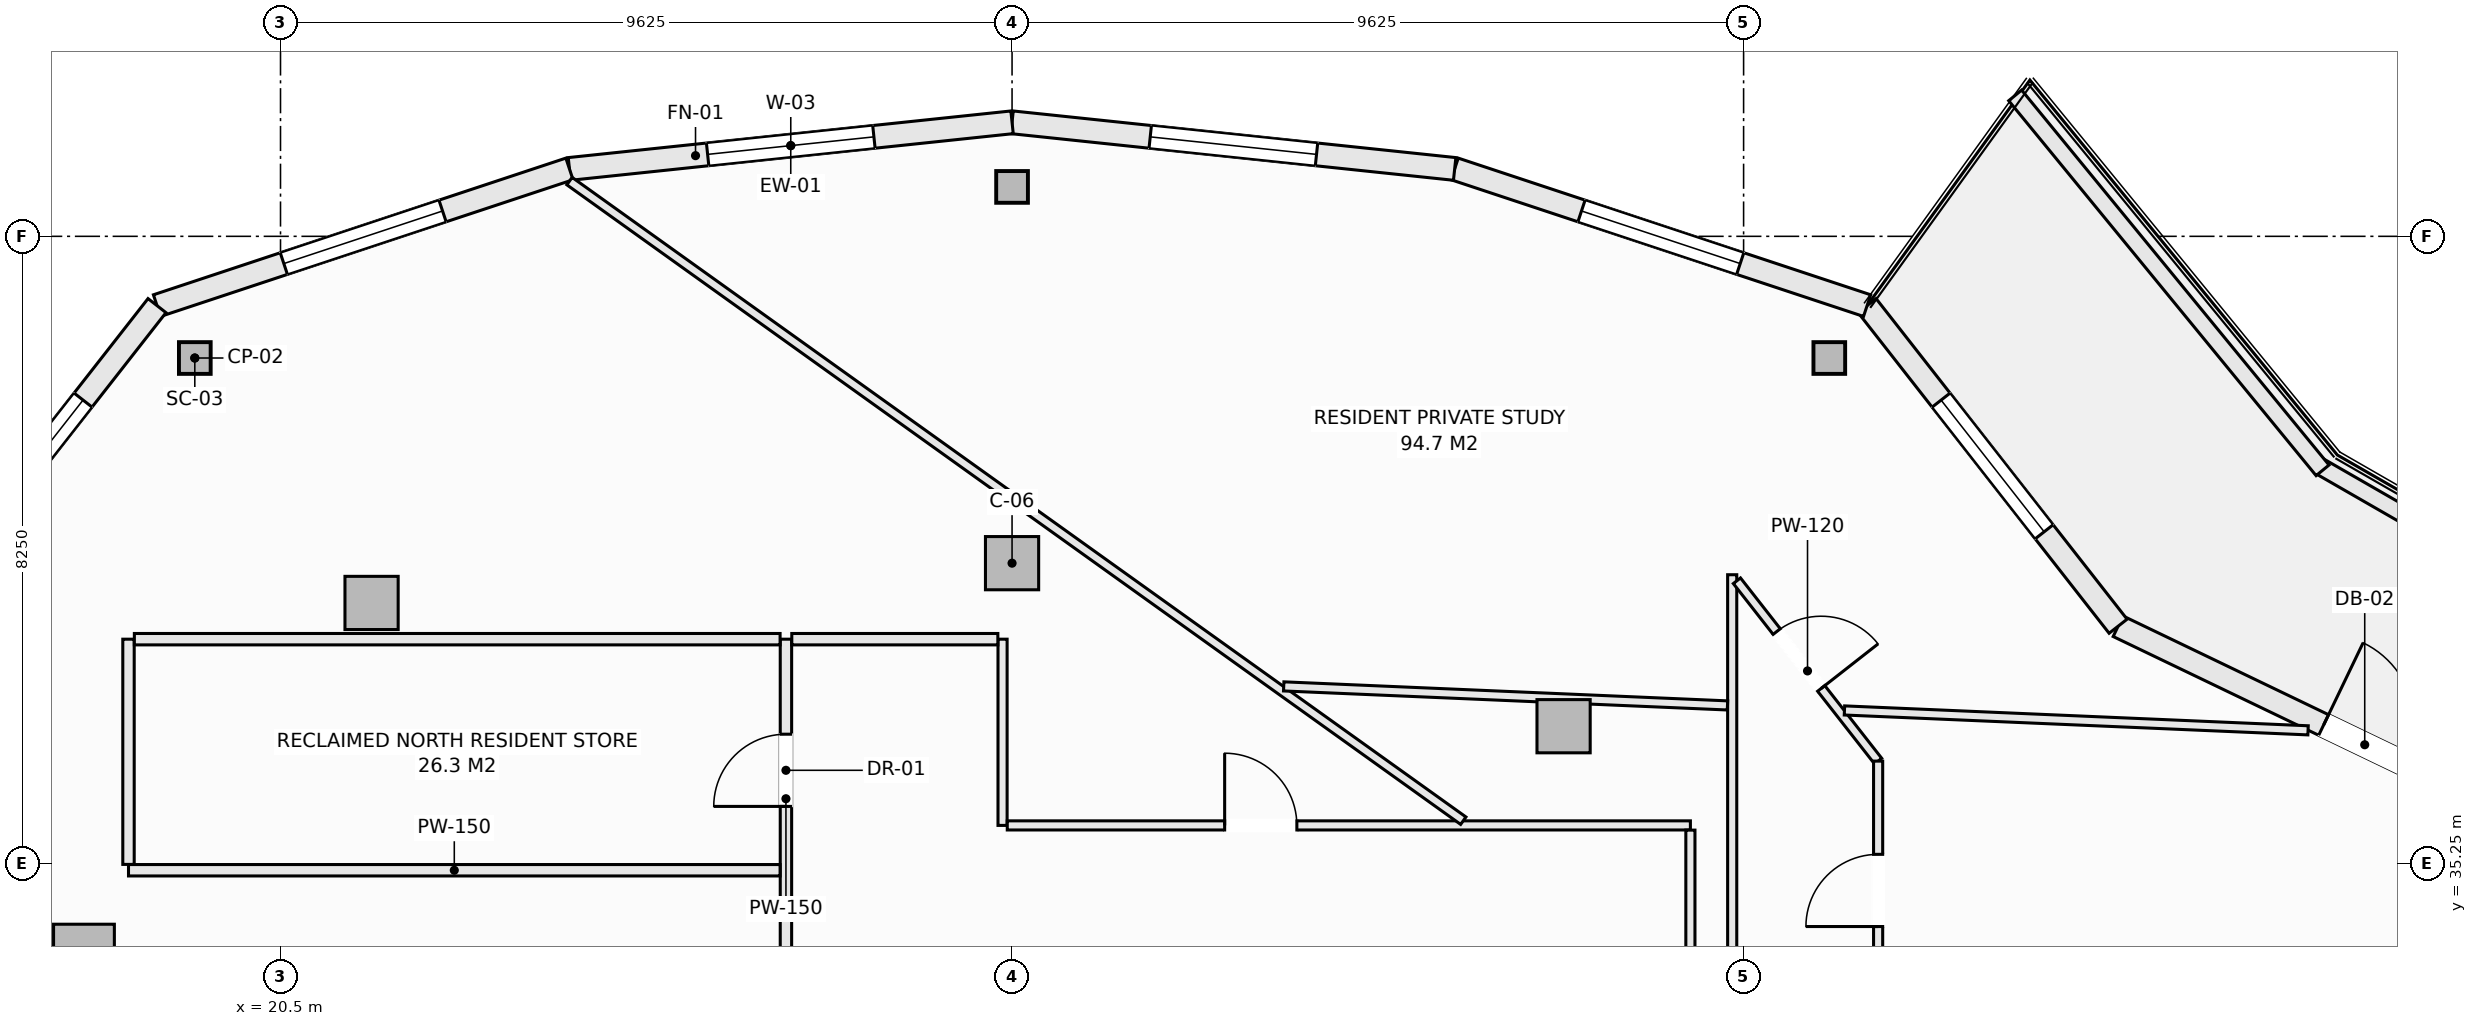
"""IFC4 building model, lengths in metres.
Left out: names, types, materials, properties, quantities, classifications, styles, units other than length and angle.
Written with IfcOpenShell. Run it as: python <this file> out.ifc"""

import sys

from ifc_helpers import new_model, si_unit, direction, frame, frame_2d, origin, origin_2d, place, context, subcontext, project, spatial, rectangle, hollow_rectangle, extrude, element, fill, save


model = new_model("IFC4")
c1 = context("Model", 3, precision=1e-05, world=origin(), true_north=direction((0.0, 1.0)))
c2 = subcontext(c1, "Body", "Model", "MODEL_VIEW")
j1 = project(units=[si_unit("LENGTHUNIT", "METRE"), si_unit("PLANEANGLEUNIT", "RADIAN")], contexts=[c1])
p1 = place(None, origin())
s1 = spatial("IfcSite", under=j1, at=p1, CompositionType="ELEMENT")
p2 = place(p1, origin())
s2 = spatial("IfcBuilding", under=s1, at=p2, CompositionType="ELEMENT")
p3 = place(p2, frame((0.0, 0.0, 255.8)))
s3 = spatial("IfcBuildingStorey", under=s2, at=p3, CompositionType="ELEMENT", Elevation=255.8)
for number, where, z_axis, x_axis in (
    (1, (40.878, 41.899, -0.27), (0.0, 0.0, 1.0), (1.0, 0.0, 0.0)),
    (2, (30.125, 44.15, -0.27), (0.0, 0.0, 1.0), (1.0, 0.0, 0.0)),
    (3, (19.372, 41.899, -0.27), (0.0, 0.0, 1.0), (1.0, 0.0, 0.0)),
):
    element("IfcColumn", number, at=place(p3, frame(where, z_axis=z_axis, x_axis=x_axis)), inside=s3, PredefinedType="COLUMN", context=c2, shape_type="SweptSolid", body=[
        extrude(hollow_rectangle(XDim=0.406, YDim=0.406, WallThickness=0.016, at=origin_2d()), origin(), (0.0, 0.0, 1.0), 3.3),
    ])
for number, where, z_axis, x_axis in (
    (4, (37.382, 37.055, -0.27), (0.0, 0.0, 1.0), (1.0, 0.0, 0.0)),
    (5, (30.125, 39.2, -0.27), (0.0, 0.0, 1.0), (1.0, 0.0, 0.0)),
    (6, (21.698, 38.677, -0.27), (0.0, 0.0, 1.0), (1.0, 0.0, 0.0)),
):
    element("IfcColumn", number, at=place(p3, frame(where, z_axis=z_axis, x_axis=x_axis)), inside=s3, PredefinedType="COLUMN", context=c2, shape_type="SweptSolid", body=[
        extrude(rectangle(XDim=0.7, YDim=0.7, at=origin_2d()), origin(), (0.0, 0.0, 1.0), 3.3),
    ])
p4 = place(p3, frame((17.914, 34.05, -0.27), z_axis=(0.0, 0.0, 1.0), x_axis=(1.0, 0.0, 0.0)))
e7 = element("IfcColumn", 7, at=p4, inside=s3, PredefinedType="PILASTER", context=c2, shape_type="SweptSolid", body=[
    extrude(rectangle(XDim=0.8, YDim=0.8, at=origin_2d()), origin(), (0.0, 0.0, 1.0), 3.3),
])
p5 = place(p3, frame((44.677, 38.37, 0.0), z_axis=(0.0, 0.0, 1.0), x_axis=(0.901355238351, -0.433080517106, 0.0)))
e8 = element("IfcWall", 8, at=p5, inside=s3, PredefinedType="SOLIDWALL", context=c2, shape_type="SweptSolid", body=[
    extrude(rectangle(XDim=5.473, YDim=0.3, at=frame_2d((2.737, 0.0))), origin(), (0.0, 0.0, 1.0), 2.605),
])
p6 = place(p5, frame((3.0, 0.0, 0.0)))
e9 = element("IfcOpeningElement", 9, at=p6, cuts=e8, PredefinedType="OPENING", context=c2, shape_type="SweptSolid", body=[
    extrude(rectangle(XDim=1.2, YDim=2.2, at=frame_2d((0.6, 1.1))), frame((0.0, 0.16, 0.0), z_axis=(0.0, -1.0, 0.0), x_axis=(1.0, 0.0, 0.0)), (0.0, 0.0, 1.0), 0.32),
])
p7 = place(p3, frame((41.375, 42.588, 0.0), z_axis=(0.0, 0.0, 1.0), x_axis=(0.61644588519, -0.787397276241, 0.0)))
e10 = element("IfcWall", 10, at=p7, inside=s3, PredefinedType="SOLIDWALL", context=c2, shape_type="SweptSolid", body=[
    extrude(rectangle(XDim=5.357, YDim=0.3, at=frame_2d((2.678, 0.0))), origin(), (0.0, 0.0, 1.0), 2.605),
])
p8 = place(p7, frame((1.579, 0.0, 0.72)))
e11 = element("IfcOpeningElement", 11, at=p8, cuts=e10, PredefinedType="OPENING", context=c2, shape_type="SweptSolid", body=[
    extrude(rectangle(XDim=2.2, YDim=1.65, at=frame_2d((1.1, 0.825))), frame((0.0, 0.16, 0.0), z_axis=(0.0, -1.0, 0.0), x_axis=(1.0, 0.0, 0.0)), (0.0, 0.0, 1.0), 0.32),
])
p9 = place(p3, frame((35.948, 44.387, 0.0), z_axis=(0.0, 0.0, 1.0), x_axis=(0.949232769585, -0.314574552605, 0.0)))
e12 = element("IfcWall", 12, at=p9, inside=s3, PredefinedType="SOLIDWALL", context=c2, shape_type="SweptSolid", body=[
    extrude(rectangle(XDim=5.717, YDim=0.3, at=frame_2d((2.858, 0.0))), origin(), (0.0, 0.0, 1.0), 2.605),
])
p10 = place(p9, frame((1.758, 0.0, 0.72)))
e13 = element("IfcOpeningElement", 13, at=p10, cuts=e12, PredefinedType="OPENING", context=c2, shape_type="SweptSolid", body=[
    extrude(rectangle(XDim=2.2, YDim=1.65, at=frame_2d((1.1, 0.825))), frame((0.0, 0.16, 0.0), z_axis=(0.0, -1.0, 0.0), x_axis=(1.0, 0.0, 0.0)), (0.0, 0.0, 1.0), 0.32),
])
p11 = place(p3, frame((30.125, 45.0, 0.0), z_axis=(0.0, 0.0, 1.0), x_axis=(0.994500425783, -0.10473253132, 0.0)))
e14 = element("IfcWall", 14, at=p11, inside=s3, PredefinedType="SOLIDWALL", context=c2, shape_type="SweptSolid", body=[
    extrude(rectangle(XDim=5.856, YDim=0.3, at=frame_2d((2.928, 0.0))), origin(), (0.0, 0.0, 1.0), 2.605),
])
p12 = place(p11, frame((1.828, 0.0, 0.72)))
e15 = element("IfcOpeningElement", 15, at=p12, cuts=e14, PredefinedType="OPENING", context=c2, shape_type="SweptSolid", body=[
    extrude(rectangle(XDim=2.2, YDim=1.65, at=frame_2d((1.1, 0.825))), frame((0.0, 0.16, 0.0), z_axis=(0.0, -1.0, 0.0), x_axis=(1.0, 0.0, 0.0)), (0.0, 0.0, 1.0), 0.32),
])
p13 = place(p3, frame((24.302, 44.387, 0.0), z_axis=(0.0, 0.0, 1.0), x_axis=(0.994500425783, 0.10473253132, 0.0)))
e16 = element("IfcWall", 16, at=p13, inside=s3, PredefinedType="SOLIDWALL", context=c2, shape_type="SweptSolid", body=[
    extrude(rectangle(XDim=5.856, YDim=0.3, at=frame_2d((2.928, 0.0))), origin(), (0.0, 0.0, 1.0), 2.605),
])
p14 = place(p13, frame((1.828, 0.0, 0.72)))
e17 = element("IfcOpeningElement", 17, at=p14, cuts=e16, PredefinedType="OPENING", context=c2, shape_type="SweptSolid", body=[
    extrude(rectangle(XDim=2.2, YDim=1.65, at=frame_2d((1.1, 0.825))), frame((0.0, 0.16, 0.0), z_axis=(0.0, -1.0, 0.0), x_axis=(1.0, 0.0, 0.0)), (0.0, 0.0, 1.0), 0.32),
])
p15 = place(p3, frame((18.875, 42.588, 0.0), z_axis=(0.0, 0.0, 1.0), x_axis=(0.949232769585, 0.314574552605, 0.0)))
e18 = element("IfcWall", 18, at=p15, inside=s3, PredefinedType="SOLIDWALL", context=c2, shape_type="SweptSolid", body=[
    extrude(rectangle(XDim=5.717, YDim=0.3, at=frame_2d((2.858, 0.0))), origin(), (0.0, 0.0, 1.0), 2.605),
])
p16 = place(p15, frame((1.758, 0.0, 0.72)))
e19 = element("IfcOpeningElement", 19, at=p16, cuts=e18, PredefinedType="OPENING", context=c2, shape_type="SweptSolid", body=[
    extrude(rectangle(XDim=2.2, YDim=1.65, at=frame_2d((1.1, 0.825))), frame((0.0, 0.16, 0.0), z_axis=(0.0, -1.0, 0.0), x_axis=(1.0, 0.0, 0.0)), (0.0, 0.0, 1.0), 0.32),
])
p17 = place(p3, frame((15.573, 38.37, 0.0), z_axis=(0.0, 0.0, 1.0), x_axis=(0.61644588519, 0.787397276241, 0.0)))
e20 = element("IfcWall", 20, at=p17, inside=s3, PredefinedType="SOLIDWALL", context=c2, shape_type="SweptSolid", body=[
    extrude(rectangle(XDim=5.357, YDim=0.3, at=frame_2d((2.678, 0.0))), origin(), (0.0, 0.0, 1.0), 2.605),
])
p18 = place(p17, frame((1.579, 0.0, 0.72)))
e21 = element("IfcOpeningElement", 21, at=p18, cuts=e20, PredefinedType="OPENING", context=c2, shape_type="SweptSolid", body=[
    extrude(rectangle(XDim=2.2, YDim=1.65, at=frame_2d((1.1, 0.825))), frame((0.0, 0.16, 0.0), z_axis=(0.0, -1.0, 0.0), x_axis=(1.0, 0.0, 0.0)), (0.0, 0.0, 1.0), 0.32),
])
p19 = place(p3, frame((47.321, 40.479, 0.0), z_axis=(0.0, 0.0, 1.0), x_axis=(0.866901621005, -0.49847926687, 0.0)))
e22 = element("IfcWall", 22, at=p19, inside=s3, PredefinedType="PARAPET", context=c2, shape_type="SweptSolid", body=[
    extrude(rectangle(XDim=6.197, YDim=0.22, at=frame_2d((3.098, 0.0))), origin(), (0.0, 0.0, 1.0), 0.52),
])
p20 = place(p3, frame((43.323, 45.354, 0.0), z_axis=(0.0, 0.0, 1.0), x_axis=(0.63407318032, -0.77327304492, 0.0)))
e23 = element("IfcWall", 23, at=p20, inside=s3, PredefinedType="PARAPET", context=c2, shape_type="SweptSolid", body=[
    extrude(rectangle(XDim=6.379, YDim=0.22, at=frame_2d((3.189, 0.0))), origin(), (0.0, 0.0, 1.0), 0.52),
])
p21 = place(p3, frame((27.15, 34.002, 0.0), z_axis=(0.0, 0.0, 1.0), x_axis=(0.0, 1.0, 0.0)))
e24 = element("IfcWall", 24, at=p21, inside=s3, PredefinedType="PARTITIONING", context=c2, shape_type="SweptSolid", body=[
    extrude(rectangle(XDim=4.198, YDim=0.15, at=frame_2d((2.099, 0.0))), origin(), (0.0, 0.0, 1.0), 3.03),
])
p22 = place(p21, frame((1.998, 0.0, 0.0)))
e25 = element("IfcOpeningElement", 25, at=p22, cuts=e24, PredefinedType="OPENING", context=c2, shape_type="SweptSolid", body=[
    extrude(rectangle(XDim=0.95, YDim=2.1, at=frame_2d((0.475, 1.05))), frame((0.0, 0.085, 0.0), z_axis=(0.0, -1.0, 0.0), x_axis=(1.0, 0.0, 0.0)), (0.0, 0.0, 1.0), 0.17),
])
p23 = place(p3, frame((30.0, 35.75, 0.0), z_axis=(0.0, 0.0, 1.0), x_axis=(0.0, 1.0, 0.0)))
e26 = element("IfcWall", 26, at=p23, inside=s3, PredefinedType="PARTITIONING", context=c2, shape_type="SweptSolid", body=[
    extrude(rectangle(XDim=2.45, YDim=0.12, at=frame_2d((1.225, 0.0))), origin(), (0.0, 0.0, 1.0), 3.03),
])
p24 = place(p3, frame((18.5, 35.16, 0.0), z_axis=(0.0, 0.0, 1.0), x_axis=(1.0, 0.0, 0.0)))
e27 = element("IfcWall", 27, at=p24, inside=s3, PredefinedType="PARTITIONING", context=c2, shape_type="SweptSolid", body=[
    extrude(rectangle(XDim=8.573, YDim=0.15, at=frame_2d((4.287, 0.0))), origin(), (0.0, 0.0, 1.0), 3.03),
])
p25 = place(p3, frame((18.5, 35.237, 0.0), z_axis=(0.0, 0.0, 1.0), x_axis=(0.0, 1.0, 0.0)))
e28 = element("IfcWall", 28, at=p25, inside=s3, PredefinedType="PARTITIONING", context=c2, shape_type="SweptSolid", body=[
    extrude(rectangle(XDim=2.963, YDim=0.15, at=frame_2d((1.481, 0.0))), origin(), (0.0, 0.0, 1.0), 3.03),
])
p26 = place(p3, frame((18.577, 38.2, 0.0), z_axis=(0.0, 0.0, 1.0), x_axis=(1.0, 0.0, 0.0)))
e29 = element("IfcWall", 29, at=p26, inside=s3, PredefinedType="PARTITIONING", context=c2, shape_type="SweptSolid", body=[
    extrude(rectangle(XDim=8.496, YDim=0.15, at=frame_2d((4.248, 0.0))), origin(), (0.0, 0.0, 1.0), 3.03),
])
p27 = place(p3, frame((27.227, 38.2, 0.0), z_axis=(0.0, 0.0, 1.0), x_axis=(1.0, 0.0, 0.0)))
e30 = element("IfcWall", 30, at=p27, inside=s3, PredefinedType="PARTITIONING", context=c2, shape_type="SweptSolid", body=[
    extrude(rectangle(XDim=2.711, YDim=0.15, at=frame_2d((1.355, 0.0))), origin(), (0.0, 0.0, 1.0), 3.03),
])
p28 = place(p3, frame((30.062, 35.75, 0.0), z_axis=(0.0, 0.0, 1.0), x_axis=(1.0, 0.0, 0.0)))
e31 = element("IfcWall", 31, at=p28, inside=s3, PredefinedType="PARTITIONING", context=c2, shape_type="SweptSolid", body=[
    extrude(rectangle(XDim=8.988, YDim=0.12, at=frame_2d((4.494, 0.0))), origin(), (0.0, 0.0, 1.0), 2.478),
])
p29 = place(p28, frame((2.86, 0.0, 0.0)))
e32 = element("IfcOpeningElement", 32, at=p29, cuts=e31, PredefinedType="OPENING", context=c2, shape_type="SweptSolid", body=[
    extrude(rectangle(XDim=0.95, YDim=2.1, at=frame_2d((0.475, 1.05))), frame((0.0, 0.07, 0.0), z_axis=(0.0, -1.0, 0.0), x_axis=(1.0, 0.0, 0.0)), (0.0, 0.0, 1.0), 0.14),
])
p30 = place(p3, frame((39.05, 33.75, 0.0), z_axis=(0.0, 0.0, 1.0), x_axis=(0.0, 1.0, 0.0)))
e33 = element("IfcWall", 33, at=p30, inside=s3, PredefinedType="PARTITIONING", context=c2, shape_type="SweptSolid", body=[
    extrude(rectangle(XDim=1.938, YDim=0.12, at=frame_2d((0.969, 0.0))), origin(), (0.0, 0.0, 1.0), 3.03),
])
p31 = place(p3, frame((39.6, 31.182, 0.0), z_axis=(0.0, 0.0, 1.0), x_axis=(0.0, 1.0, 0.0)))
e34 = element("IfcWall", 34, at=p31, inside=s3, PredefinedType="PARTITIONING", context=c2, shape_type="SweptSolid", body=[
    extrude(rectangle(XDim=7.866, YDim=0.12, at=frame_2d((3.933, 0.0))), origin(), (0.0, 0.0, 1.0), 3.03),
])
p32 = place(p3, frame((39.662, 38.969, 0.0), z_axis=(0.0, 0.0, 1.0), x_axis=(0.616500468458, -0.787354540465, 0.0)))
e35 = element("IfcWall", 35, at=p32, inside=s3, PredefinedType="PARTITIONING", context=c2, shape_type="SweptSolid", body=[
    extrude(rectangle(XDim=3.014, YDim=0.12, at=frame_2d((1.507, 0.0))), origin(), (0.0, 0.0, 1.0), 3.03),
])
p33 = place(p32, frame((0.849, 0.0, 0.0)))
e36 = element("IfcOpeningElement", 36, at=p33, cuts=e35, PredefinedType="OPENING", context=c2, shape_type="SweptSolid", body=[
    extrude(rectangle(XDim=0.95, YDim=2.1, at=frame_2d((0.475, 1.05))), frame((0.0, 0.07, 0.0), z_axis=(0.0, -1.0, 0.0), x_axis=(1.0, 0.0, 0.0)), (0.0, 0.0, 1.0), 0.14),
])
p34 = place(p3, frame((41.52, 33.193, 0.0), z_axis=(0.0, 0.0, 1.0), x_axis=(0.0, 1.0, 0.0)))
e37 = element("IfcWall", 37, at=p34, inside=s3, PredefinedType="PARTITIONING", context=c2, shape_type="SweptSolid", body=[
    extrude(rectangle(XDim=3.403, YDim=0.12, at=frame_2d((1.701, 0.0))), origin(), (0.0, 0.0, 1.0), 3.03),
])
p35 = place(p34, frame((1.227, 0.0, 0.0)))
e38 = element("IfcOpeningElement", 38, at=p35, cuts=e37, PredefinedType="OPENING", context=c2, shape_type="SweptSolid", body=[
    extrude(rectangle(XDim=0.95, YDim=2.1, at=frame_2d((0.475, 1.05))), frame((0.0, 0.07, 0.0), z_axis=(0.0, -1.0, 0.0), x_axis=(1.0, 0.0, 0.0)), (0.0, 0.0, 1.0), 0.14),
])
p36 = place(p3, frame((24.302, 44.227, 0.0), z_axis=(0.0, 0.0, 1.0), x_axis=(0.813249507018, -0.581915147883, 0.0)))
e39 = element("IfcWall", 39, at=p36, inside=s3, PredefinedType="PARTITIONING", context=c2, shape_type="SweptSolid", body=[
    extrude(rectangle(XDim=14.46, YDim=0.12, at=frame_2d((7.23, 0.0))), origin(), (0.0, 0.0, 1.0), 2.478),
])
p37 = place(p3, frame((33.699, 37.579, 0.0), z_axis=(0.0, 0.0, 1.0), x_axis=(0.999081056781, -0.042860727724, 0.0)))
e40 = element("IfcWall", 40, at=p37, inside=s3, PredefinedType="PARTITIONING", context=c2, shape_type="SweptSolid", body=[
    extrude(rectangle(XDim=5.844, YDim=0.12, at=frame_2d((2.922, 0.0))), origin(), (0.0, 0.0, 1.0), 2.478),
])
p38 = place(p3, frame((41.077, 37.262, 0.0), z_axis=(0.0, 0.0, 1.0), x_axis=(0.999080744008, -0.042868017834, 0.0)))
e41 = element("IfcWall", 41, at=p38, inside=s3, PredefinedType="PARTITIONING", context=c2, shape_type="SweptSolid", body=[
    extrude(rectangle(XDim=6.105, YDim=0.12, at=frame_2d((3.053, 0.0))), origin(), (0.0, 0.0, 1.0), 2.605),
])
p39 = place(p6, origin())
e42 = element("IfcDoor", 42, at=p39, inside=s3, OperationType="SINGLE_SWING_LEFT", PredefinedType="DOOR", context=c2, shape_type="SweptSolid", body=[
    extrude(rectangle(XDim=1.2, YDim=2.2, at=frame_2d((0.6, 1.1))), frame((0.0, 0.025, 0.0), z_axis=(0.0, -1.0, 0.0), x_axis=(1.0, 0.0, 0.0)), (0.0, 0.0, 1.0), 0.05),
])
fill(e9, e42)
p40 = place(p8, origin())
e43 = element("IfcWindow", 43, at=p40, inside=s3, PartitioningType="SINGLE_PANEL", PredefinedType="WINDOW", context=c2, shape_type="SweptSolid", body=[
    extrude(rectangle(XDim=2.2, YDim=1.65, at=frame_2d((1.1, 0.825))), frame((0.0, 0.03, 0.0), z_axis=(0.0, -1.0, 0.0), x_axis=(1.0, 0.0, 0.0)), (0.0, 0.0, 1.0), 0.06),
])
fill(e11, e43)
p41 = place(p10, origin())
e44 = element("IfcWindow", 44, at=p41, inside=s3, PartitioningType="SINGLE_PANEL", PredefinedType="WINDOW", context=c2, shape_type="SweptSolid", body=[
    extrude(rectangle(XDim=2.2, YDim=1.65, at=frame_2d((1.1, 0.825))), frame((0.0, 0.03, 0.0), z_axis=(0.0, -1.0, 0.0), x_axis=(1.0, 0.0, 0.0)), (0.0, 0.0, 1.0), 0.06),
])
fill(e13, e44)
p42 = place(p12, origin())
e45 = element("IfcWindow", 45, at=p42, inside=s3, PartitioningType="SINGLE_PANEL", PredefinedType="WINDOW", context=c2, shape_type="SweptSolid", body=[
    extrude(rectangle(XDim=2.2, YDim=1.65, at=frame_2d((1.1, 0.825))), frame((0.0, 0.03, 0.0), z_axis=(0.0, -1.0, 0.0), x_axis=(1.0, 0.0, 0.0)), (0.0, 0.0, 1.0), 0.06),
])
fill(e15, e45)
p43 = place(p14, origin())
e46 = element("IfcWindow", 46, at=p43, inside=s3, PartitioningType="SINGLE_PANEL", PredefinedType="WINDOW", context=c2, shape_type="SweptSolid", body=[
    extrude(rectangle(XDim=2.2, YDim=1.65, at=frame_2d((1.1, 0.825))), frame((0.0, 0.03, 0.0), z_axis=(0.0, -1.0, 0.0), x_axis=(1.0, 0.0, 0.0)), (0.0, 0.0, 1.0), 0.06),
])
fill(e17, e46)
p44 = place(p16, origin())
e47 = element("IfcWindow", 47, at=p44, inside=s3, PartitioningType="SINGLE_PANEL", PredefinedType="WINDOW", context=c2, shape_type="SweptSolid", body=[
    extrude(rectangle(XDim=2.2, YDim=1.65, at=frame_2d((1.1, 0.825))), frame((0.0, 0.03, 0.0), z_axis=(0.0, -1.0, 0.0), x_axis=(1.0, 0.0, 0.0)), (0.0, 0.0, 1.0), 0.06),
])
fill(e19, e47)
p45 = place(p18, origin())
e48 = element("IfcWindow", 48, at=p45, inside=s3, PartitioningType="SINGLE_PANEL", PredefinedType="WINDOW", context=c2, shape_type="SweptSolid", body=[
    extrude(rectangle(XDim=2.2, YDim=1.65, at=frame_2d((1.1, 0.825))), frame((0.0, 0.03, 0.0), z_axis=(0.0, -1.0, 0.0), x_axis=(1.0, 0.0, 0.0)), (0.0, 0.0, 1.0), 0.06),
])
fill(e21, e48)
p46 = place(p22, origin())
e49 = element("IfcDoor", 49, at=p46, inside=s3, OperationType="SINGLE_SWING_LEFT", PredefinedType="DOOR", context=c2, shape_type="SweptSolid", body=[
    extrude(rectangle(XDim=0.95, YDim=2.1, at=frame_2d((0.475, 1.05))), frame((0.0, 0.025, 0.0), z_axis=(0.0, -1.0, 0.0), x_axis=(1.0, 0.0, 0.0)), (0.0, 0.0, 1.0), 0.05),
])
fill(e25, e49)
p47 = place(p35, origin())
e50 = element("IfcDoor", 50, at=p47, inside=s3, OperationType="SINGLE_SWING_LEFT", PredefinedType="DOOR", context=c2, shape_type="SweptSolid", body=[
    extrude(rectangle(XDim=0.95, YDim=2.1, at=frame_2d((0.475, 1.05))), frame((0.0, 0.025, 0.0), z_axis=(0.0, -1.0, 0.0), x_axis=(1.0, 0.0, 0.0)), (0.0, 0.0, 1.0), 0.05),
])
fill(e38, e50)
p48 = place(p33, origin())
e51 = element("IfcDoor", 51, at=p48, inside=s3, OperationType="SINGLE_SWING_RIGHT", PredefinedType="DOOR", context=c2, shape_type="SweptSolid", body=[
    extrude(rectangle(XDim=0.95, YDim=2.1, at=frame_2d((0.475, 1.05))), frame((0.0, 0.025, 0.0), z_axis=(0.0, -1.0, 0.0), x_axis=(1.0, 0.0, 0.0)), (0.0, 0.0, 1.0), 0.05),
])
fill(e36, e51)
p49 = place(p29, origin())
e52 = element("IfcDoor", 52, at=p49, inside=s3, OperationType="SINGLE_SWING_LEFT", PredefinedType="DOOR", context=c2, shape_type="SweptSolid", body=[
    extrude(rectangle(XDim=0.95, YDim=2.1, at=frame_2d((0.475, 1.05))), frame((0.0, 0.025, 0.0), z_axis=(0.0, -1.0, 0.0), x_axis=(1.0, 0.0, 0.0)), (0.0, 0.0, 1.0), 0.05),
])
fill(e32, e52)
save(model, sys.argv[1])
